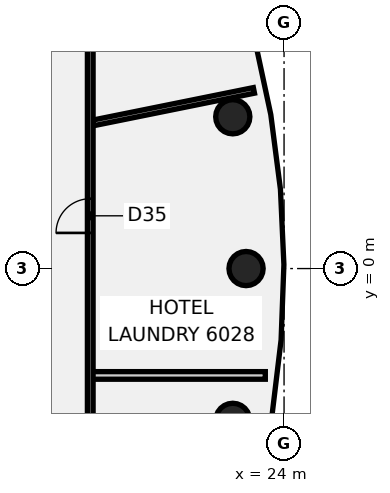
"""IFC4 building model, lengths in metres.
Left out: names, types, materials, properties, quantities, classifications, styles, units other than length and angle.
Written with IfcOpenShell. Run it as: python <this file> out.ifc"""

import sys

from ifc_helpers import new_model, si_unit, direction, frame, frame_2d, origin, origin_2d, place, context, subcontext, project, spatial, rectangle, circle, extrude, element, fill, save


model = new_model("IFC4")
c1 = context("Model", 3, precision=1e-05, world=origin(), true_north=direction((0.0, 1.0)))
c2 = subcontext(c1, "Body", "Model", "MODEL_VIEW")
j1 = project(units=[si_unit("LENGTHUNIT", "METRE"), si_unit("PLANEANGLEUNIT", "RADIAN")], contexts=[c1])
p1 = place(None, origin())
s1 = spatial("IfcSite", under=j1, at=p1, CompositionType="ELEMENT")
p2 = place(p1, origin())
s2 = spatial("IfcBuilding", under=s1, at=p2, CompositionType="ELEMENT")
p3 = place(p2, frame((0.0, 0.0, 237.9)))
s3 = spatial("IfcBuildingStorey", under=s2, at=p3, CompositionType="ELEMENT", Elevation=237.9)
for number, where, z_axis, x_axis in (
    (1, (23.0, 0.0, -0.14), (0.0, 0.0, 1.0), (1.0, 0.0, 0.0)),
    (2, (22.651, 3.994, -0.14), (0.0, 0.0, 1.0), (1.0, 0.0, 0.0)),
    (3, (22.651, -3.994, -0.14), (0.0, 0.0, 1.0), (1.0, 0.0, 0.0)),
):
    element("IfcColumn", number, at=place(p3, frame(where, z_axis=z_axis, x_axis=x_axis)), inside=s3, PredefinedType="COLUMN", context=c2, shape_type="SweptSolid", body=[
        extrude(circle(Radius=0.45, at=origin_2d()), origin(), (0.0, 0.0, 1.0), 3.6),
    ])
p4 = place(p3, frame((18.955, -2.812, 0.0), z_axis=(0.0, 0.0, 1.0), x_axis=(1.0, 0.0, 0.0)))
e4 = element("IfcWall", 4, at=p4, inside=s3, PredefinedType="PARTITIONING", context=c2, shape_type="SweptSolid", body=[
    extrude(rectangle(XDim=4.552, YDim=0.2, at=frame_2d((2.276, 0.0))), origin(), (0.0, 0.0, 1.0), 2.864),
])
p5 = place(p3, frame((18.973, 3.832, 0.0), z_axis=(0.0, 0.0, 1.0), x_axis=(0.980158884244, 0.198213424463, 0.0)))
e5 = element("IfcWall", 5, at=p5, inside=s3, PredefinedType="PARTITIONING", context=c2, shape_type="SweptSolid", body=[
    extrude(rectangle(XDim=4.32, YDim=0.15, at=frame_2d((2.16, 0.0))), origin(), (0.0, 0.0, 1.0), 2.864),
])
p6 = place(p3, frame((18.9, -10.1, 0.0), z_axis=(0.0, 0.0, 1.0), x_axis=(0.0, 1.0, 0.0)))
e6 = element("IfcWall", 6, at=p6, inside=s3, PredefinedType="PARTITIONING", context=c2, shape_type="SweptSolid", body=[
    extrude(rectangle(XDim=20.2, YDim=0.15, at=frame_2d((10.1, 0.0))), origin(), (0.0, 0.0, 1.0), 2.864),
])
p7 = place(p6, frame((2.4, 0.0, 0.0)))
e7 = element("IfcOpeningElement", 7, at=p7, cuts=e6, PredefinedType="OPENING", context=c2, shape_type="SweptSolid", body=[
    extrude(rectangle(XDim=0.9, YDim=2.1, at=frame_2d((0.45, 1.05))), frame((0.0, 0.085, 0.0), z_axis=(0.0, -1.0, 0.0), x_axis=(1.0, 0.0, 0.0)), (0.0, 0.0, 1.0), 0.17),
])
p8 = place(p6, frame((11.038, 0.0, 0.0)))
e8 = element("IfcOpeningElement", 8, at=p8, cuts=e6, PredefinedType="OPENING", context=c2, shape_type="SweptSolid", body=[
    extrude(rectangle(XDim=0.9, YDim=2.1, at=frame_2d((0.45, 1.05))), frame((0.0, 0.085, 0.0), z_axis=(0.0, -1.0, 0.0), x_axis=(1.0, 0.0, 0.0)), (0.0, 0.0, 1.0), 0.17),
])
p9 = place(p8, frame((0.9, 0.0, 0.0), z_axis=(0.0, 0.0, 1.0), x_axis=(-1.0, 0.0, 0.0)))
e9 = element("IfcDoor", 9, at=p9, inside=s3, OperationType="SINGLE_SWING_RIGHT", PredefinedType="DOOR", context=c2, shape_type="SweptSolid", body=[
    extrude(rectangle(XDim=0.9, YDim=2.1, at=frame_2d((0.45, 1.05))), frame((0.0, 0.025, 0.0), z_axis=(0.0, -1.0, 0.0), x_axis=(1.0, 0.0, 0.0)), (0.0, 0.0, 1.0), 0.05),
])
fill(e8, e9)
save(model, sys.argv[1])
